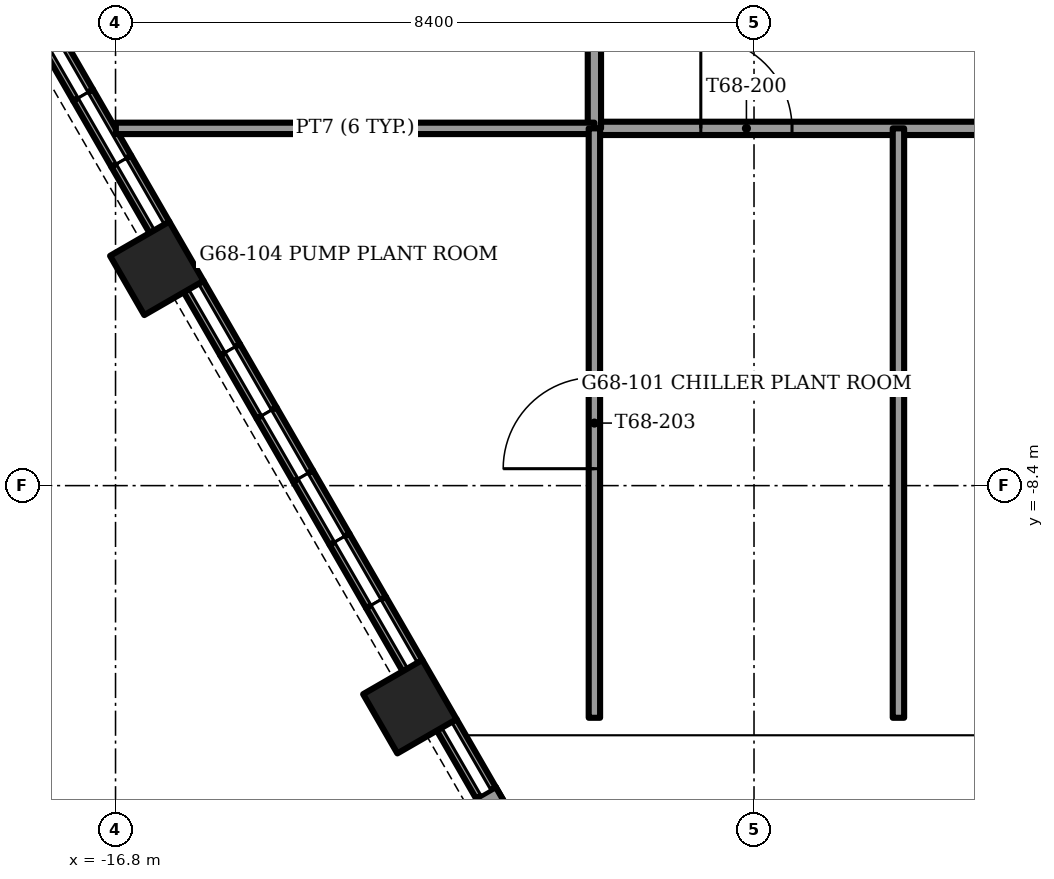
"""IFC4 building model, lengths in metres.
Left out: names, types, materials, properties, quantities, classifications, styles, units other than length and angle.
Written with IfcOpenShell. Run it as: python <this file> out.ifc"""

import sys

from ifc_helpers import new_model, si_unit, direction, frame, frame_2d, origin, origin_2d, place, context, subcontext, project, spatial, rectangle, extrude, element, fill, save


model = new_model("IFC4")
c1 = context("Model", 3, precision=1e-05, world=origin(), true_north=direction((0.0, 1.0)))
c2 = subcontext(c1, "Body", "Model", "MODEL_VIEW")
j1 = project(units=[si_unit("LENGTHUNIT", "METRE"), si_unit("PLANEANGLEUNIT", "RADIAN")], contexts=[c1])
p1 = place(None, origin())
s1 = spatial("IfcSite", under=j1, at=p1, CompositionType="ELEMENT")
p2 = place(p1, origin())
s2 = spatial("IfcBuilding", under=s1, at=p2, CompositionType="ELEMENT")
p3 = place(p2, frame((0.0, 0.0, 275.0)))
s3 = spatial("IfcBuildingStorey", under=s2, at=p3, CompositionType="ELEMENT", Elevation=275.0)
p4 = place(p3, frame((-16.257, -5.542, -1.2), z_axis=(0.0, 0.0, 1.0), x_axis=(-0.5, 0.866025403784, 0.0)))
e1 = element("IfcColumn", 1, at=p4, inside=s3, PredefinedType="COLUMN", context=c2, shape_type="SweptSolid", body=[
    extrude(rectangle(XDim=0.9, YDim=0.9, at=origin_2d()), origin(), (0.0, 0.0, 1.0), 4.5),
])
p5 = place(p3, frame((-12.928, -11.308, -1.2), z_axis=(0.0, 0.0, 1.0), x_axis=(-0.5, 0.866025403784, 0.0)))
e2 = element("IfcColumn", 2, at=p5, inside=s3, PredefinedType="COLUMN", context=c2, shape_type="SweptSolid", body=[
    extrude(rectangle(XDim=0.9, YDim=0.9, at=origin_2d()), origin(), (0.0, 0.0, 1.0), 4.341),
])
p6 = place(p3, frame((-17.728, -2.394, 0.0), z_axis=(0.0, 0.0, 1.0), x_axis=(0.499933044277, -0.866064057238, 0.0)))
e3 = element("IfcWall", 3, at=p6, inside=s3, PredefinedType="SOLIDWALL", context=c2, shape_type="SweptSolid", body=[
    extrude(rectangle(XDim=1.004, YDim=0.3, at=frame_2d((0.502, 0.0))), origin(), (0.0, 0.0, 1.0), 1.0),
])
p7 = place(p3, frame((-17.226, -3.263, 0.0), z_axis=(0.0, 0.0, 1.0), x_axis=(0.499904868165, -0.866080321209, 0.0)))
e4 = element("IfcWall", 4, at=p7, inside=s3, PredefinedType="SOLIDWALL", context=c2, shape_type="SweptSolid", body=[
    extrude(rectangle(XDim=1.004, YDim=0.3, at=frame_2d((0.502, 0.0))), origin(), (0.0, 0.0, 1.0), 1.0),
])
p8 = place(p3, frame((-16.724, -4.133, 0.0), z_axis=(0.0, 0.0, 1.0), x_axis=(0.500115484592, -0.865958718457, 0.0)))
e5 = element("IfcWall", 5, at=p8, inside=s3, PredefinedType="SOLIDWALL", context=c2, shape_type="SweptSolid", body=[
    extrude(rectangle(XDim=1.004, YDim=0.3, at=frame_2d((0.502, 0.0))), origin(), (0.0, 0.0, 1.0), 1.0),
])
p9 = place(p3, frame((-15.772, -5.781, 0.0), z_axis=(0.0, 0.0, 1.0), x_axis=(0.500133489192, -0.865948320045, 0.0)))
e6 = element("IfcWall", 6, at=p9, inside=s3, PredefinedType="SOLIDWALL", context=c2, shape_type="SweptSolid", body=[
    extrude(rectangle(XDim=0.96, YDim=0.3, at=frame_2d((0.48, 0.0))), origin(), (0.0, 0.0, 1.0), 1.0),
])
p10 = place(p3, frame((-15.292, -6.613, 0.0), z_axis=(0.0, 0.0, 1.0), x_axis=(0.500023335103, -0.866011930837, 0.0)))
e7 = element("IfcWall", 7, at=p10, inside=s3, PredefinedType="SOLIDWALL", context=c2, shape_type="SweptSolid", body=[
    extrude(rectangle(XDim=0.96, YDim=0.3, at=frame_2d((0.48, 0.0))), origin(), (0.0, 0.0, 1.0), 1.0),
])
p11 = place(p3, frame((-14.812, -7.444, 0.0), z_axis=(0.0, 0.0, 1.0), x_axis=(0.499942693199, -0.866058487353, 0.0)))
e8 = element("IfcWall", 8, at=p11, inside=s3, PredefinedType="SOLIDWALL", context=c2, shape_type="SweptSolid", body=[
    extrude(rectangle(XDim=0.959, YDim=0.3, at=frame_2d((0.48, 0.0))), origin(), (0.0, 0.0, 1.0), 1.0),
])
for number, where, z_axis, x_axis in (
    (9, (-14.333, -8.275, 0.0), (0.0, 0.0, 1.0), (0.5, -0.866, 0.0)),
    (10, (-13.853, -9.106, 0.0), (0.0, 0.0, 1.0), (0.5, -0.866, 0.0)),
):
    element("IfcWall", number, at=place(p3, frame(where, z_axis=z_axis, x_axis=x_axis)), inside=s3, PredefinedType="SOLIDWALL", context=c2, shape_type="SweptSolid", body=[
        extrude(rectangle(XDim=0.96, YDim=0.3, at=frame_2d((0.48, 0.0))), origin(), (0.0, 0.0, 1.0), 1.0),
    ])
p12 = place(p3, frame((-13.373, -9.938, 0.0), z_axis=(0.0, 0.0, 1.0), x_axis=(0.499942693199, -0.866058487353, 0.0)))
e11 = element("IfcWall", 11, at=p12, inside=s3, PredefinedType="SOLIDWALL", context=c2, shape_type="SweptSolid", body=[
    extrude(rectangle(XDim=0.959, YDim=0.3, at=frame_2d((0.48, 0.0))), origin(), (0.0, 0.0, 1.0), 1.0),
])
for number, where, z_axis, x_axis in (
    (12, (-12.443, -11.548, 0.0), (0.0, 0.0, 1.0), (0.5, -0.866, 0.0)),
    (13, (-11.927, -12.441, 0.0), (0.0, 0.0, 1.0), (0.5, -0.866, 0.0)),
):
    element("IfcWall", number, at=place(p3, frame(where, z_axis=z_axis, x_axis=x_axis)), inside=s3, PredefinedType="SOLIDWALL", context=c2, shape_type="SweptSolid", body=[
        extrude(rectangle(XDim=1.031, YDim=0.3, at=frame_2d((0.516, 0.0))), origin(), (0.0, 0.0, 1.0), 1.0),
    ])
p13 = place(p3, frame((-11.927, -12.441, 1.0), z_axis=(0.0, 0.0, 1.0), x_axis=(0.500084376221, -0.86597668367, 0.0)))
e14 = element("IfcWall", 14, at=p13, inside=s3, PredefinedType="SOLIDWALL", context=c2, shape_type="SweptSolid", body=[
    extrude(rectangle(XDim=1.031, YDim=0.3, at=frame_2d((0.516, 0.0))), origin(), (0.0, 0.0, 1.0), 0.746),
])
p14 = place(p3, frame((-10.5, -3.7, 0.0), z_axis=(0.0, 0.0, 1.0), x_axis=(1.0, 0.0, 0.0)))
e15 = element("IfcWall", 15, at=p14, inside=s3, PredefinedType="PARTITIONING", context=c2, shape_type="SweptSolid", body=[
    extrude(rectangle(XDim=16.07, YDim=0.175, at=frame_2d((8.035, 0.0))), origin(), (0.0, 0.0, 1.0), 4.2),
])
p15 = place(p14, frame((1.4, 0.0, 0.0)))
e16 = element("IfcOpeningElement", 16, at=p15, cuts=e15, PredefinedType="OPENING", context=c2, shape_type="SweptSolid", body=[
    extrude(rectangle(XDim=1.2, YDim=2.1, at=frame_2d((0.6, 1.05))), frame((0.0, 0.087, 0.0), z_axis=(0.0, -1.0, 0.0), x_axis=(1.0, 0.0, 0.0)), (0.0, 0.0, 1.0), 0.175),
])
p16 = place(p14, frame((6.65, 0.0, 0.0)))
e17 = element("IfcOpeningElement", 17, at=p16, cuts=e15, PredefinedType="OPENING", context=c2, shape_type="SweptSolid", body=[
    extrude(rectangle(XDim=1.2, YDim=2.1, at=frame_2d((0.6, 1.05))), frame((0.0, 0.087, 0.0), z_axis=(0.0, -1.0, 0.0), x_axis=(1.0, 0.0, 0.0)), (0.0, 0.0, 1.0), 0.175),
])
p17 = place(p14, frame((12.685, 0.0, 0.0)))
e18 = element("IfcOpeningElement", 18, at=p17, cuts=e15, PredefinedType="OPENING", context=c2, shape_type="SweptSolid", body=[
    extrude(rectangle(XDim=1.2, YDim=2.1, at=frame_2d((0.6, 1.05))), frame((0.0, 0.087, 0.0), z_axis=(0.0, -1.0, 0.0), x_axis=(1.0, 0.0, 0.0)), (0.0, 0.0, 1.0), 0.175),
])
p18 = place(p3, frame((-10.5, -3.7, 0.0), z_axis=(0.0, 0.0, 1.0), x_axis=(0.0, 1.0, 0.0)))
e19 = element("IfcWall", 19, at=p18, inside=s3, PredefinedType="PARTITIONING", context=c2, shape_type="SweptSolid", body=[
    extrude(rectangle(XDim=13.4, YDim=0.175, at=frame_2d((6.7, 0.0))), origin(), (0.0, 0.0, 1.0), 4.2),
])
p19 = place(p18, frame((6.1, 0.0, 0.0)))
e20 = element("IfcOpeningElement", 20, at=p19, cuts=e19, PredefinedType="OPENING", context=c2, shape_type="SweptSolid", body=[
    extrude(rectangle(XDim=1.2, YDim=2.1, at=frame_2d((0.6, 1.05))), frame((0.0, 0.087, 0.0), z_axis=(0.0, -1.0, 0.0), x_axis=(1.0, 0.0, 0.0)), (0.0, 0.0, 1.0), 0.175),
])
p20 = place(p3, frame((-16.796, -3.7, 0.0), z_axis=(0.0, 0.0, 1.0), x_axis=(1.0, 0.0, 0.0)))
e21 = element("IfcWall", 21, at=p20, inside=s3, PredefinedType="PARTITIONING", context=c2, shape_type="SweptSolid", body=[
    extrude(rectangle(XDim=6.296, YDim=0.15, at=frame_2d((3.148, 0.0))), origin(), (0.0, 0.0, 1.0), 4.2),
])
p21 = place(p3, frame((-10.5, -11.454, 0.0), z_axis=(0.0, 0.0, 1.0), x_axis=(0.0, 1.0, 0.0)))
e22 = element("IfcWall", 22, at=p21, inside=s3, PredefinedType="PARTITIONING", context=c2, shape_type="SweptSolid", body=[
    extrude(rectangle(XDim=7.754, YDim=0.15, at=frame_2d((3.877, 0.0))), origin(), (0.0, 0.0, 1.0), 4.067),
])
p22 = place(p21, frame((3.277, 0.0, 0.0)))
e23 = element("IfcOpeningElement", 23, at=p22, cuts=e22, PredefinedType="OPENING", context=c2, shape_type="SweptSolid", body=[
    extrude(rectangle(XDim=1.2, YDim=2.1, at=frame_2d((0.6, 1.05))), frame((0.0, 0.075, 0.0), z_axis=(0.0, -1.0, 0.0), x_axis=(1.0, 0.0, 0.0)), (0.0, 0.0, 1.0), 0.15),
])
p23 = place(p3, frame((-6.5, -11.454, 0.0), z_axis=(0.0, 0.0, 1.0), x_axis=(0.0, 1.0, 0.0)))
e24 = element("IfcWall", 24, at=p23, inside=s3, PredefinedType="PARTITIONING", context=c2, shape_type="SweptSolid", body=[
    extrude(rectangle(XDim=7.754, YDim=0.15, at=frame_2d((3.877, 0.0))), origin(), (0.0, 0.0, 1.0), 4.067),
])
p24 = place(p15, origin())
e25 = element("IfcDoor", 25, at=p24, inside=s3, OperationType="SINGLE_SWING_RIGHT", PredefinedType="DOOR", context=c2, shape_type="SweptSolid", body=[
    extrude(rectangle(XDim=1.2, YDim=2.1, at=frame_2d((0.6, 1.05))), frame((0.0, 0.025, 0.0), z_axis=(0.0, -1.0, 0.0), x_axis=(1.0, 0.0, 0.0)), (0.0, 0.0, 1.0), 0.05),
])
fill(e16, e25)
p25 = place(p22, origin())
e26 = element("IfcDoor", 26, at=p25, inside=s3, OperationType="SINGLE_SWING_LEFT", PredefinedType="DOOR", context=c2, shape_type="SweptSolid", body=[
    extrude(rectangle(XDim=1.2, YDim=2.1, at=frame_2d((0.6, 1.05))), frame((0.0, 0.025, 0.0), z_axis=(0.0, -1.0, 0.0), x_axis=(1.0, 0.0, 0.0)), (0.0, 0.0, 1.0), 0.05),
])
fill(e23, e26)
save(model, sys.argv[1])
